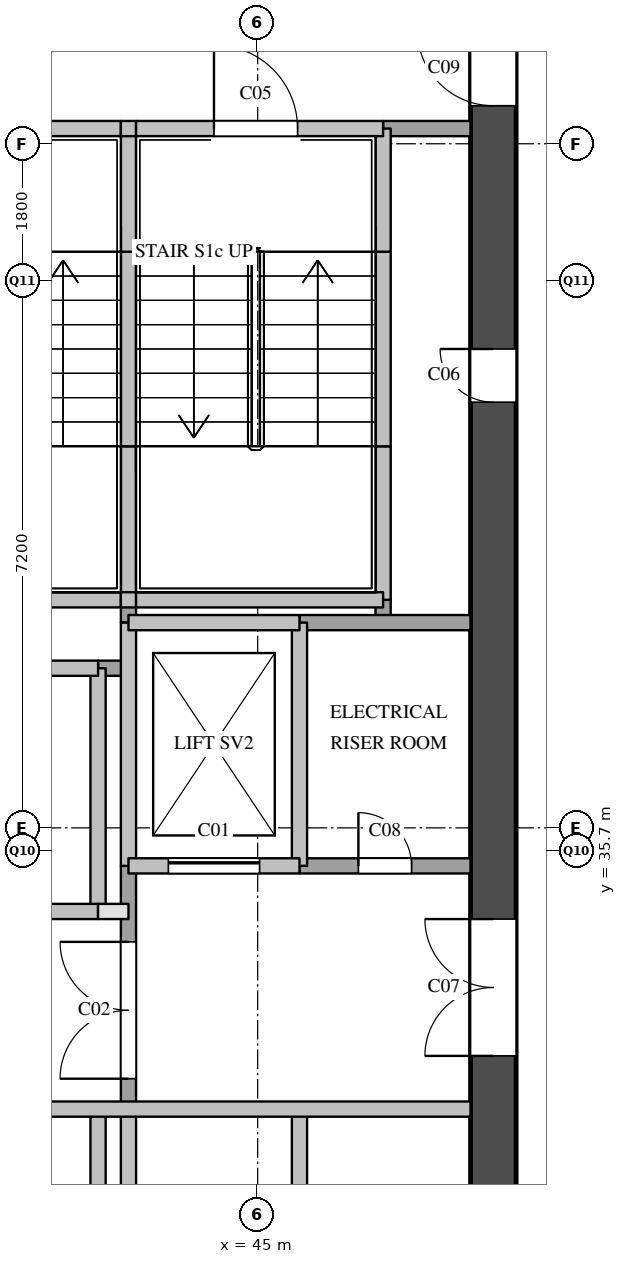
"""IFC4 building model, lengths in metres.
Left out: names, types, materials, properties, quantities, classifications, styles, units other than length and angle.
Written with IfcOpenShell. Run it as: python <this file> out.ifc"""

import sys

from ifc_helpers import new_model, si_unit, direction, frame, frame_2d, origin, place, context, subcontext, project, spatial, rectangle, extrude, element, fill, save


model = new_model("IFC4")
c1 = context("Model", 3, precision=1e-05, world=origin(), true_north=direction((0.0, 1.0)))
c2 = subcontext(c1, "Body", "Model", "MODEL_VIEW")
j1 = project(units=[si_unit("LENGTHUNIT", "METRE"), si_unit("PLANEANGLEUNIT", "RADIAN")], contexts=[c1])
p1 = place(None, origin())
s1 = spatial("IfcSite", under=j1, at=p1, CompositionType="ELEMENT")
p2 = place(p1, origin())
s2 = spatial("IfcBuilding", under=s1, at=p2, CompositionType="ELEMENT")
p3 = place(p2, frame((0.0, 0.0, -6.0)))
s3 = spatial("IfcBuildingStorey", under=s2, at=p3, CompositionType="ELEMENT", Elevation=-6.0)
p4 = place(p3, frame((48.1, 29.1, 0.0), z_axis=(0.0, 0.0, 1.0), x_axis=(0.0, 1.0, 0.0)))
e1 = element("IfcWall", 1, at=p4, inside=s3, PredefinedType="SHEAR", context=c2, shape_type="SweptSolid", body=[
    extrude(rectangle(XDim=20.3, YDim=0.6, at=frame_2d((10.15, 0.0))), origin(), (0.0, 0.0, 1.0), 5.59),
])
p5 = place(p4, frame((12.5, 0.0, 0.0)))
e2 = element("IfcOpeningElement", 2, at=p5, cuts=e1, PredefinedType="OPENING", context=c2, shape_type="SweptSolid", body=[
    extrude(rectangle(XDim=0.7, YDim=2.1, at=frame_2d((0.35, 1.05))), frame((0.0, 0.31, 0.0), z_axis=(0.0, -1.0, 0.0), x_axis=(1.0, 0.0, 0.0)), (0.0, 0.0, 1.0), 0.62),
])
p6 = place(p4, frame((3.9, 0.0, 0.0)))
e3 = element("IfcOpeningElement", 3, at=p6, cuts=e1, PredefinedType="OPENING", context=c2, shape_type="SweptSolid", body=[
    extrude(rectangle(XDim=1.8, YDim=2.1, at=frame_2d((0.9, 1.05))), frame((0.0, 0.31, 0.0), z_axis=(0.0, -1.0, 0.0), x_axis=(1.0, 0.0, 0.0)), (0.0, 0.0, 1.0), 0.62),
])
p7 = place(p4, frame((16.4, 0.0, 0.0)))
e4 = element("IfcOpeningElement", 4, at=p7, cuts=e1, PredefinedType="OPENING", context=c2, shape_type="SweptSolid", body=[
    extrude(rectangle(XDim=1.0, YDim=2.1, at=frame_2d((0.5, 1.05))), frame((0.0, 0.31, 0.0), z_axis=(0.0, -1.0, 0.0), x_axis=(1.0, 0.0, 0.0)), (0.0, 0.0, 1.0), 0.62),
])
p8 = place(p3, frame((42.9, 29.1, 0.0), z_axis=(0.0, 0.0, 1.0), x_axis=(0.0, 1.0, 0.0)))
e5 = element("IfcWall", 5, at=p8, inside=s3, PredefinedType="SOLIDWALL", context=c2, shape_type="SweptSolid", body=[
    extrude(rectangle(XDim=3.2, YDim=0.2, at=frame_2d((1.6, 0.0))), origin(), (0.0, 0.0, 1.0), 5.59),
])
p9 = place(p3, frame((42.9, 34.9, 0.0), z_axis=(0.0, 0.0, 1.0), x_axis=(0.0, 1.0, 0.0)))
e6 = element("IfcWall", 6, at=p9, inside=s3, PredefinedType="SOLIDWALL", context=c2, shape_type="SweptSolid", body=[
    extrude(rectangle(XDim=3.2, YDim=0.2, at=frame_2d((1.6, 0.0))), origin(), (0.0, 0.0, 1.0), 5.59),
])
for number, where, z_axis, x_axis in (
    (7, (43.3, 29.1, 0.0), (0.0, 0.0, 1.0), (0.0, 1.0, 0.0)),
    (8, (43.3, 35.5, 0.0), (0.0, 0.0, 1.0), (0.0, 1.0, 0.0)),
):
    element("IfcWall", number, at=place(p3, frame(where, z_axis=z_axis, x_axis=x_axis)), inside=s3, PredefinedType="SOLIDWALL", context=c2, shape_type="SweptSolid", body=[
        extrude(rectangle(XDim=3.2, YDim=0.2, at=frame_2d((1.6, 0.0))), origin(), (0.0, 0.0, 1.0), 5.59),
    ])
p10 = place(p3, frame((43.3, 32.3, 0.0), z_axis=(0.0, 0.0, 1.0), x_axis=(0.0, 1.0, 0.0)))
e9 = element("IfcWall", 9, at=p10, inside=s3, PredefinedType="SOLIDWALL", context=c2, shape_type="SweptSolid", body=[
    extrude(rectangle(XDim=3.2, YDim=0.2, at=frame_2d((1.6, 0.0))), origin(), (0.0, 0.0, 1.0), 5.59),
])
p11 = place(p10, frame((0.4, 0.0, 0.0)))
e10 = element("IfcOpeningElement", 10, at=p11, cuts=e9, PredefinedType="OPENING", context=c2, shape_type="SweptSolid", body=[
    extrude(rectangle(XDim=1.8, YDim=2.1, at=frame_2d((0.9, 1.05))), frame((0.0, 0.11, 0.0), z_axis=(0.0, -1.0, 0.0), x_axis=(1.0, 0.0, 0.0)), (0.0, 0.0, 1.0), 0.22),
])
p12 = place(p3, frame((43.3, 38.7, 0.0), z_axis=(0.0, 0.0, 1.0), x_axis=(0.0, 1.0, 0.0)))
e11 = element("IfcWall", 11, at=p12, inside=s3, PredefinedType="SOLIDWALL", context=c2, shape_type="SweptSolid", body=[
    extrude(rectangle(XDim=0.3, YDim=0.2, at=frame_2d((0.15, 0.0))), origin(), (0.0, 0.0, 1.0), 5.59),
])
p13 = place(p3, frame((43.3, 39.0, 0.0), z_axis=(0.0, 0.0, 1.0), x_axis=(0.0, 1.0, 0.0)))
e12 = element("IfcWall", 12, at=p13, inside=s3, PredefinedType="SOLIDWALL", context=c2, shape_type="SweptSolid", body=[
    extrude(rectangle(XDim=2.02, YDim=0.2, at=frame_2d((1.01, 0.0))), origin(), (0.0, 0.0, 1.0), 5.59),
])
p14 = place(p3, frame((43.3, 41.02, 0.0), z_axis=(0.0, 0.0, 1.0), x_axis=(0.0, 1.0, 0.0)))
e13 = element("IfcWall", 13, at=p14, inside=s3, PredefinedType="SOLIDWALL", context=c2, shape_type="SweptSolid", body=[
    extrude(rectangle(XDim=2.56, YDim=0.2, at=frame_2d((1.28, 0.0))), origin(), (0.0, 0.0, 1.0), 5.59),
])
p15 = place(p3, frame((43.3, 43.58, 0.0), z_axis=(0.0, 0.0, 1.0), x_axis=(0.0, 1.0, 0.0)))
e14 = element("IfcWall", 14, at=p15, inside=s3, PredefinedType="SOLIDWALL", context=c2, shape_type="SweptSolid", body=[
    extrude(rectangle(XDim=1.62, YDim=0.2, at=frame_2d((0.81, 0.0))), origin(), (0.0, 0.0, 1.0), 5.59),
])
for number, where, z_axis, x_axis in (
    (15, (45.55, 29.1, 0.0), (0.0, 0.0, 1.0), (0.0, 1.0, 0.0)),
    (16, (45.55, 35.5, 0.0), (0.0, 0.0, 1.0), (0.0, 1.0, 0.0)),
):
    element("IfcWall", number, at=place(p3, frame(where, z_axis=z_axis, x_axis=x_axis)), inside=s3, PredefinedType="SOLIDWALL", context=c2, shape_type="SweptSolid", body=[
        extrude(rectangle(XDim=3.2, YDim=0.2, at=frame_2d((1.6, 0.0))), origin(), (0.0, 0.0, 1.0), 5.59),
    ])
p16 = place(p3, frame((46.65, 38.7, 0.0), z_axis=(0.0, 0.0, 1.0), x_axis=(0.0, 1.0, 0.0)))
e17 = element("IfcWall", 17, at=p16, inside=s3, PredefinedType="SOLIDWALL", context=c2, shape_type="SweptSolid", body=[
    extrude(rectangle(XDim=0.3, YDim=0.2, at=frame_2d((0.15, 0.0))), origin(), (0.0, 0.0, 1.0), 5.59),
])
p17 = place(p3, frame((46.65, 39.0, 0.0), z_axis=(0.0, 0.0, 1.0), x_axis=(0.0, 1.0, 0.0)))
e18 = element("IfcWall", 18, at=p17, inside=s3, PredefinedType="SOLIDWALL", context=c2, shape_type="SweptSolid", body=[
    extrude(rectangle(XDim=2.02, YDim=0.2, at=frame_2d((1.01, 0.0))), origin(), (0.0, 0.0, 1.0), 5.59),
])
p18 = place(p3, frame((46.65, 41.02, 0.0), z_axis=(0.0, 0.0, 1.0), x_axis=(0.0, 1.0, 0.0)))
e19 = element("IfcWall", 19, at=p18, inside=s3, PredefinedType="SOLIDWALL", context=c2, shape_type="SweptSolid", body=[
    extrude(rectangle(XDim=2.56, YDim=0.2, at=frame_2d((1.28, 0.0))), origin(), (0.0, 0.0, 1.0), 5.59),
])
p19 = place(p3, frame((46.65, 43.58, 0.0), z_axis=(0.0, 0.0, 1.0), x_axis=(0.0, 1.0, 0.0)))
e20 = element("IfcWall", 20, at=p19, inside=s3, PredefinedType="SOLIDWALL", context=c2, shape_type="SweptSolid", body=[
    extrude(rectangle(XDim=1.62, YDim=0.2, at=frame_2d((0.81, 0.0))), origin(), (0.0, 0.0, 1.0), 5.59),
])
p20 = place(p3, frame((36.6, 32.3, 0.0), z_axis=(0.0, 0.0, 1.0), x_axis=(1.0, 0.0, 0.0)))
e21 = element("IfcWall", 21, at=p20, inside=s3, PredefinedType="SOLIDWALL", context=c2, shape_type="SweptSolid", body=[
    extrude(rectangle(XDim=11.2, YDim=0.2, at=frame_2d((5.6, 0.0))), origin(), (0.0, 0.0, 1.0), 5.59),
])
p21 = place(p3, frame((42.9, 34.9, 0.0), z_axis=(0.0, 0.0, 1.0), x_axis=(1.0, 0.0, 0.0)))
e22 = element("IfcWall", 22, at=p21, inside=s3, PredefinedType="PARTITIONING", context=c2, shape_type="SweptSolid", body=[
    extrude(rectangle(XDim=0.4, YDim=0.2, at=frame_2d((0.2, 0.0))), origin(), (0.0, 0.0, 1.0), 5.59),
])
p22 = place(p3, frame((36.6, 34.9, 0.0), z_axis=(0.0, 0.0, 1.0), x_axis=(1.0, 0.0, 0.0)))
e23 = element("IfcWall", 23, at=p22, inside=s3, PredefinedType="SOLIDWALL", context=c2, shape_type="SweptSolid", body=[
    extrude(rectangle(XDim=6.3, YDim=0.2, at=frame_2d((3.15, 0.0))), origin(), (0.0, 0.0, 1.0), 5.59),
])
p23 = place(p3, frame((43.3, 35.5, 0.0), z_axis=(0.0, 0.0, 1.0), x_axis=(1.0, 0.0, 0.0)))
e24 = element("IfcWall", 24, at=p23, inside=s3, PredefinedType="SOLIDWALL", context=c2, shape_type="SweptSolid", body=[
    extrude(rectangle(XDim=2.25, YDim=0.2, at=frame_2d((1.125, 0.0))), origin(), (0.0, 0.0, 1.0), 5.59),
])
p24 = place(p23, frame((0.525, 0.0, 0.0)))
e25 = element("IfcOpeningElement", 25, at=p24, cuts=e24, PredefinedType="OPENING", context=c2, shape_type="SweptSolid", body=[
    extrude(rectangle(XDim=1.2, YDim=2.1, at=frame_2d((0.6, 1.05))), frame((0.0, 0.11, 0.0), z_axis=(0.0, -1.0, 0.0), x_axis=(1.0, 0.0, 0.0)), (0.0, 0.0, 1.0), 0.22),
])
p25 = place(p3, frame((45.55, 35.5, 0.0), z_axis=(0.0, 0.0, 1.0), x_axis=(1.0, 0.0, 0.0)))
e26 = element("IfcWall", 26, at=p25, inside=s3, PredefinedType="SOLIDWALL", context=c2, shape_type="SweptSolid", body=[
    extrude(rectangle(XDim=2.25, YDim=0.2, at=frame_2d((1.125, 0.0))), origin(), (0.0, 0.0, 1.0), 5.59),
])
p26 = place(p25, frame((0.775, 0.0, 0.0)))
e27 = element("IfcOpeningElement", 27, at=p26, cuts=e26, PredefinedType="OPENING", context=c2, shape_type="SweptSolid", body=[
    extrude(rectangle(XDim=0.7, YDim=2.1, at=frame_2d((0.35, 1.05))), frame((0.0, 0.11, 0.0), z_axis=(0.0, -1.0, 0.0), x_axis=(1.0, 0.0, 0.0)), (0.0, 0.0, 1.0), 0.22),
])
p27 = place(p3, frame((36.6, 38.1, 0.0), z_axis=(0.0, 0.0, 1.0), x_axis=(1.0, 0.0, 0.0)))
e28 = element("IfcWall", 28, at=p27, inside=s3, PredefinedType="SOLIDWALL", context=c2, shape_type="SweptSolid", body=[
    extrude(rectangle(XDim=6.3, YDim=0.2, at=frame_2d((3.15, 0.0))), origin(), (0.0, 0.0, 1.0), 5.59),
])
p28 = place(p3, frame((42.9, 38.1, 0.0), z_axis=(0.0, 0.0, 1.0), x_axis=(1.0, 0.0, 0.0)))
e29 = element("IfcWall", 29, at=p28, inside=s3, PredefinedType="SOLIDWALL", context=c2, shape_type="SweptSolid", body=[
    extrude(rectangle(XDim=0.4, YDim=0.2, at=frame_2d((0.2, 0.0))), origin(), (0.0, 0.0, 1.0), 5.59),
])
for number, where, z_axis, x_axis in (
    (30, (43.3, 38.7, 0.0), (0.0, 0.0, 1.0), (1.0, 0.0, 0.0)),
    (31, (45.55, 38.7, 0.0), (0.0, 0.0, 1.0), (1.0, 0.0, 0.0)),
):
    element("IfcWall", number, at=place(p3, frame(where, z_axis=z_axis, x_axis=x_axis)), inside=s3, PredefinedType="SOLIDWALL", context=c2, shape_type="SweptSolid", body=[
        extrude(rectangle(XDim=2.25, YDim=0.2, at=frame_2d((1.125, 0.0))), origin(), (0.0, 0.0, 1.0), 5.59),
    ])
p29 = place(p3, frame((40.05, 39.0, 0.0), z_axis=(0.0, 0.0, 1.0), x_axis=(1.0, 0.0, 0.0)))
e32 = element("IfcWall", 32, at=p29, inside=s3, PredefinedType="SOLIDWALL", context=c2, shape_type="SweptSolid", body=[
    extrude(rectangle(XDim=3.15, YDim=0.2, at=frame_2d((1.575, 0.0))), origin(), (0.0, 0.0, 1.0), 5.59),
])
p30 = place(p3, frame((43.2, 39.0, 0.0), z_axis=(0.0, 0.0, 1.0), x_axis=(1.0, 0.0, 0.0)))
e33 = element("IfcWall", 33, at=p30, inside=s3, PredefinedType="SOLIDWALL", context=c2, shape_type="SweptSolid", body=[
    extrude(rectangle(XDim=0.2, YDim=0.2, at=frame_2d((0.1, 0.0))), origin(), (0.0, 0.0, 1.0), 5.59),
])
p31 = place(p3, frame((43.4, 39.0, 0.0), z_axis=(0.0, 0.0, 1.0), x_axis=(1.0, 0.0, 0.0)))
e34 = element("IfcWall", 34, at=p31, inside=s3, PredefinedType="SOLIDWALL", context=c2, shape_type="SweptSolid", body=[
    extrude(rectangle(XDim=3.25, YDim=0.2, at=frame_2d((1.625, 0.0))), origin(), (0.0, 0.0, 1.0), 5.59),
])
p32 = place(p3, frame((46.65, 45.2, 0.0), z_axis=(0.0, 0.0, 1.0), x_axis=(1.0, 0.0, 0.0)))
e35 = element("IfcWall", 35, at=p32, inside=s3, PredefinedType="SOLIDWALL", context=c2, shape_type="SweptSolid", body=[
    extrude(rectangle(XDim=1.15, YDim=0.2, at=frame_2d((0.575, 0.0))), origin(), (0.0, 0.0, 1.0), 5.59),
])
p33 = place(p3, frame((40.05, 45.2, 0.0), z_axis=(0.0, 0.0, 1.0), x_axis=(1.0, 0.0, 0.0)))
e36 = element("IfcWall", 36, at=p33, inside=s3, PredefinedType="SOLIDWALL", context=c2, shape_type="SweptSolid", body=[
    extrude(rectangle(XDim=3.15, YDim=0.2, at=frame_2d((1.575, 0.0))), origin(), (0.0, 0.0, 1.0), 5.59),
])
p34 = place(p33, frame((1.025, 0.0, 0.0)))
e37 = element("IfcOpeningElement", 37, at=p34, cuts=e36, PredefinedType="OPENING", context=c2, shape_type="SweptSolid", body=[
    extrude(rectangle(XDim=1.1, YDim=2.1, at=frame_2d((0.55, 1.05))), frame((0.0, 0.11, 0.0), z_axis=(0.0, -1.0, 0.0), x_axis=(1.0, 0.0, 0.0)), (0.0, 0.0, 1.0), 0.22),
])
p35 = place(p3, frame((43.2, 45.2, 0.0), z_axis=(0.0, 0.0, 1.0), x_axis=(1.0, 0.0, 0.0)))
e38 = element("IfcWall", 38, at=p35, inside=s3, PredefinedType="SOLIDWALL", context=c2, shape_type="SweptSolid", body=[
    extrude(rectangle(XDim=0.2, YDim=0.2, at=frame_2d((0.1, 0.0))), origin(), (0.0, 0.0, 1.0), 5.59),
])
p36 = place(p3, frame((43.4, 45.2, 0.0), z_axis=(0.0, 0.0, 1.0), x_axis=(1.0, 0.0, 0.0)))
e39 = element("IfcWall", 39, at=p36, inside=s3, PredefinedType="SOLIDWALL", context=c2, shape_type="SweptSolid", body=[
    extrude(rectangle(XDim=3.25, YDim=0.2, at=frame_2d((1.625, 0.0))), origin(), (0.0, 0.0, 1.0), 5.59),
])
p37 = place(p36, frame((1.025, 0.0, 0.0)))
e40 = element("IfcOpeningElement", 40, at=p37, cuts=e39, PredefinedType="OPENING", context=c2, shape_type="SweptSolid", body=[
    extrude(rectangle(XDim=1.1, YDim=2.1, at=frame_2d((0.55, 1.05))), frame((0.0, 0.11, 0.0), z_axis=(0.0, -1.0, 0.0), x_axis=(1.0, 0.0, 0.0)), (0.0, 0.0, 1.0), 0.22),
])
p38 = place(p24, origin())
e41 = element("IfcDoor", 41, at=p38, inside=s3, OperationType="SLIDING_TO_LEFT", PredefinedType="DOOR", context=c2, shape_type="SweptSolid", body=[
    extrude(rectangle(XDim=1.2, YDim=2.1, at=frame_2d((0.6, 1.05))), frame((0.0, 0.025, 0.0), z_axis=(0.0, -1.0, 0.0), x_axis=(1.0, 0.0, 0.0)), (0.0, 0.0, 1.0), 0.05),
])
fill(e25, e41)
p39 = place(p11, origin())
e42 = element("IfcDoor", 42, at=p39, inside=s3, OperationType="DOUBLE_DOOR_SINGLE_SWING", PredefinedType="DOOR", context=c2, shape_type="SweptSolid", body=[
    extrude(rectangle(XDim=1.8, YDim=2.1, at=frame_2d((0.9, 1.05))), frame((0.0, 0.025, 0.0), z_axis=(0.0, -1.0, 0.0), x_axis=(1.0, 0.0, 0.0)), (0.0, 0.0, 1.0), 0.05),
])
fill(e10, e42)
p40 = place(p37, origin())
e43 = element("IfcDoor", 43, at=p40, inside=s3, OperationType="SINGLE_SWING_LEFT", PredefinedType="DOOR", context=c2, shape_type="SweptSolid", body=[
    extrude(rectangle(XDim=1.1, YDim=2.1, at=frame_2d((0.55, 1.05))), frame((0.0, 0.025, 0.0), z_axis=(0.0, -1.0, 0.0), x_axis=(1.0, 0.0, 0.0)), (0.0, 0.0, 1.0), 0.05),
])
fill(e40, e43)
p41 = place(p5, origin())
e44 = element("IfcDoor", 44, at=p41, inside=s3, OperationType="SINGLE_SWING_RIGHT", PredefinedType="DOOR", context=c2, shape_type="SweptSolid", body=[
    extrude(rectangle(XDim=0.7, YDim=2.1, at=frame_2d((0.35, 1.05))), frame((0.0, 0.025, 0.0), z_axis=(0.0, -1.0, 0.0), x_axis=(1.0, 0.0, 0.0)), (0.0, 0.0, 1.0), 0.05),
])
fill(e2, e44)
p42 = place(p6, origin())
e45 = element("IfcDoor", 45, at=p42, inside=s3, OperationType="DOUBLE_DOOR_SINGLE_SWING", PredefinedType="DOOR", context=c2, shape_type="SweptSolid", body=[
    extrude(rectangle(XDim=1.8, YDim=2.1, at=frame_2d((0.9, 1.05))), frame((0.0, 0.025, 0.0), z_axis=(0.0, -1.0, 0.0), x_axis=(1.0, 0.0, 0.0)), (0.0, 0.0, 1.0), 0.05),
])
fill(e3, e45)
p43 = place(p26, origin())
e46 = element("IfcDoor", 46, at=p43, inside=s3, OperationType="SINGLE_SWING_LEFT", PredefinedType="DOOR", context=c2, shape_type="SweptSolid", body=[
    extrude(rectangle(XDim=0.7, YDim=2.1, at=frame_2d((0.35, 1.05))), frame((0.0, 0.025, 0.0), z_axis=(0.0, -1.0, 0.0), x_axis=(1.0, 0.0, 0.0)), (0.0, 0.0, 1.0), 0.05),
])
fill(e27, e46)
p44 = place(p7, origin())
e47 = element("IfcDoor", 47, at=p44, inside=s3, OperationType="SINGLE_SWING_RIGHT", PredefinedType="DOOR", context=c2, shape_type="SweptSolid", body=[
    extrude(rectangle(XDim=1.0, YDim=2.1, at=frame_2d((0.5, 1.05))), frame((0.0, 0.025, 0.0), z_axis=(0.0, -1.0, 0.0), x_axis=(1.0, 0.0, 0.0)), (0.0, 0.0, 1.0), 0.05),
])
fill(e4, e47)
save(model, sys.argv[1])
